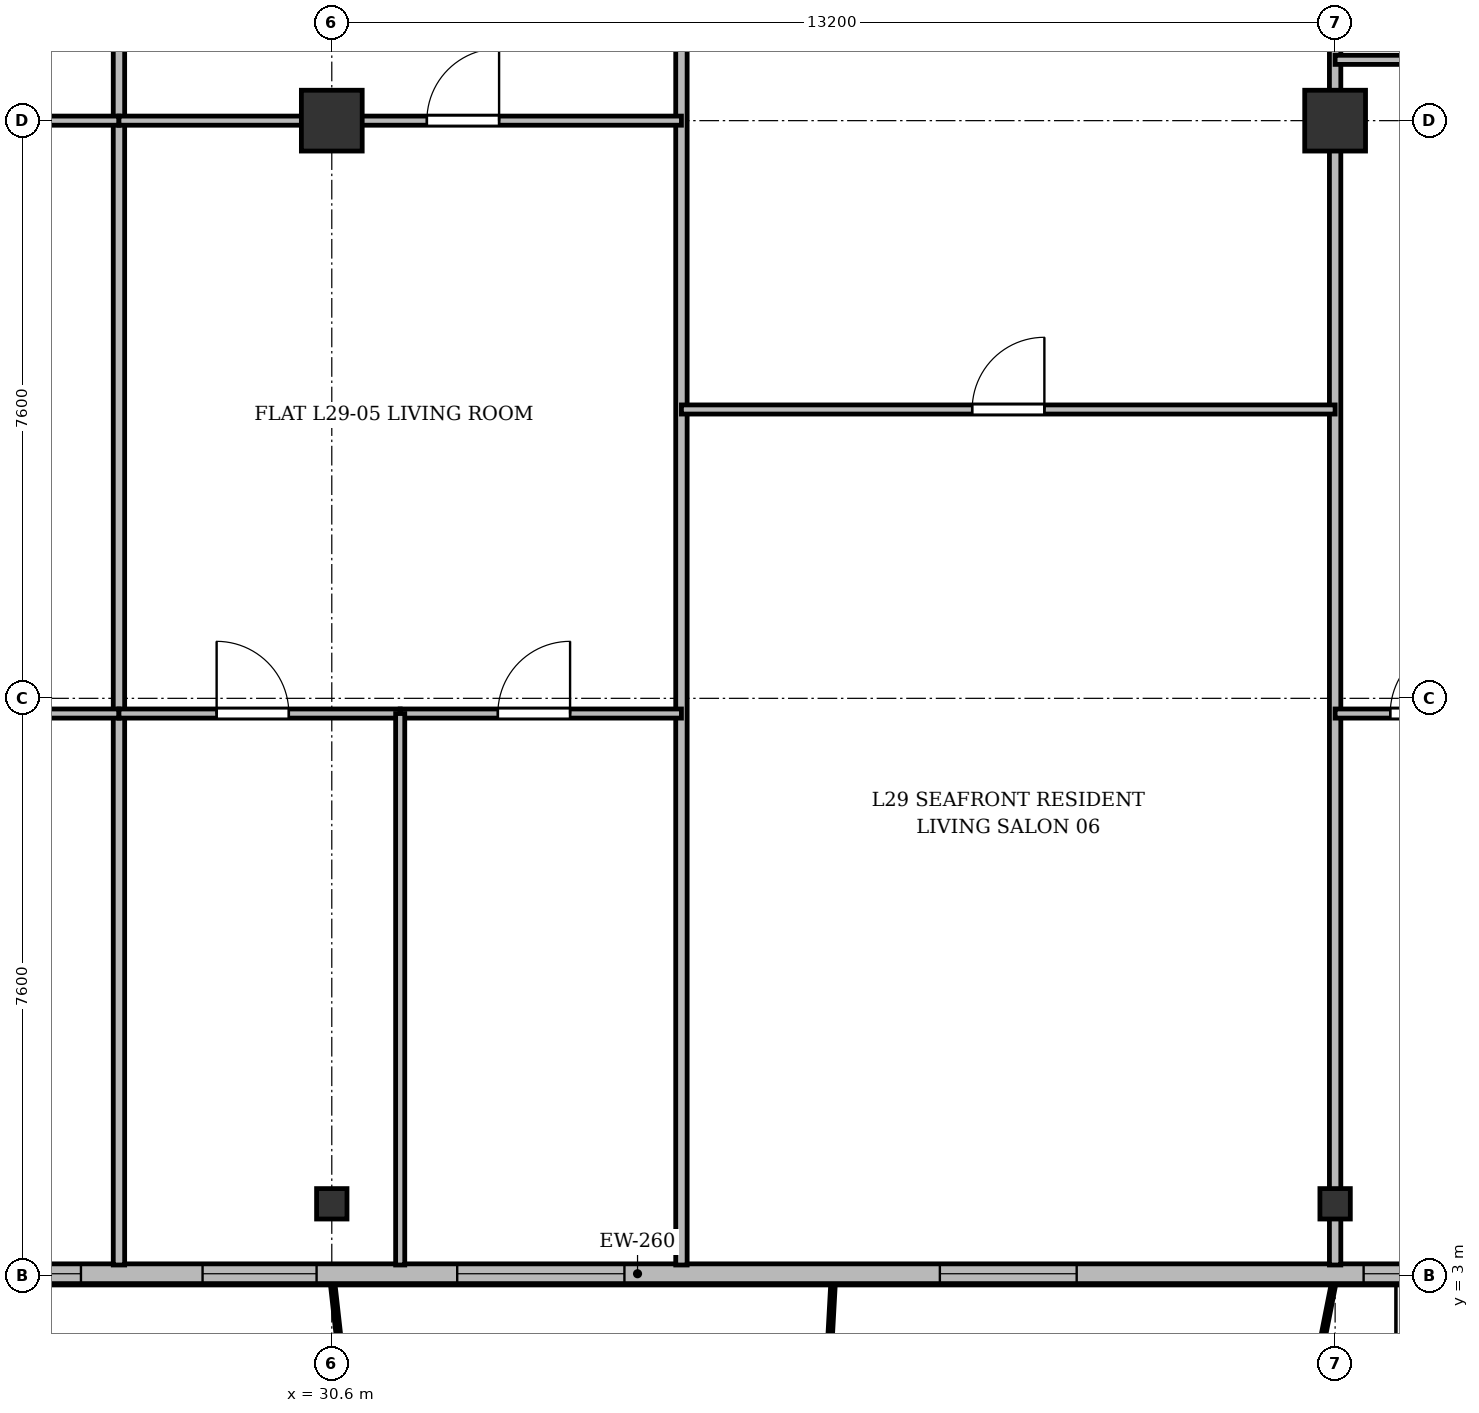
"""IFC4 building model, lengths in metres.
Left out: names, types, materials, properties, quantities, classifications, styles, units other than length and angle.
Written with IfcOpenShell. Run it as: python <this file> out.ifc"""

import sys

from ifc_helpers import new_model, si_unit, direction, frame, frame_2d, origin, origin_2d, place, context, subcontext, project, spatial, rectangle, i_section, extrude, source, transform, mapped, element, fill, save


model = new_model("IFC4")
c1 = context("Model", 3, precision=1e-05, world=origin(), true_north=direction((0.0, 1.0)))
c2 = subcontext(c1, "Body", "Model", "MODEL_VIEW")
j1 = project(units=[si_unit("LENGTHUNIT", "METRE"), si_unit("PLANEANGLEUNIT", "RADIAN")], contexts=[c1])
p1 = place(None, origin())
s1 = spatial("IfcSite", under=j1, at=p1, CompositionType="ELEMENT")
p2 = place(p1, origin())
s2 = spatial("IfcBuilding", under=s1, at=p2, CompositionType="ELEMENT")
p3 = place(p2, frame((0.0, 0.0, 114.1)))
s3 = spatial("IfcBuildingStorey", under=s2, at=p3, CompositionType="ELEMENT", Elevation=114.1)
m1 = source(origin(), c2, "Body", "SweptSolid", [
    extrude(i_section(OverallWidth=0.4, OverallDepth=0.4, WebThickness=0.022, FlangeThickness=0.035, at=origin_2d()), origin(), (0.0, 0.0, 1.0), 3.6),
])
p4 = place(p3, frame((30.6, 3.95, 0.0), z_axis=(0.0, 0.0, 1.0), x_axis=(1.0, 0.0, 0.0)))
e1 = element("IfcColumn", 1, at=p4, inside=s3, PredefinedType="COLUMN", context=c2, shape_type="MappedRepresentation", body=[
    mapped(m1, transform((0.0, 0.0, 0.0), x_axis=(1.0, 0.0, 0.0), y_axis=(0.0, 1.0, 0.0), z_axis=(0.0, 0.0, 1.0), scale=1.0)),
])
m2 = source(origin(), c2, "Body", "SweptSolid", [
    extrude(rectangle(XDim=0.8, YDim=0.8, at=origin_2d()), origin(), (0.0, 0.0, 1.0), 3.6),
])
p5 = place(p3, frame((30.6, 18.2, 0.0), z_axis=(0.0, 0.0, 1.0), x_axis=(1.0, 0.0, 0.0)))
e2 = element("IfcColumn", 2, at=p5, inside=s3, PredefinedType="COLUMN", context=c2, shape_type="MappedRepresentation", body=[
    mapped(m2, transform((0.0, 0.0, 0.0), x_axis=(1.0, 0.0, 0.0), y_axis=(0.0, 1.0, 0.0), z_axis=(0.0, 0.0, 1.0), scale=1.0)),
])
p6 = place(p3, frame((43.8, 3.95, 0.0), z_axis=(0.0, 0.0, 1.0), x_axis=(1.0, 0.0, 0.0)))
e3 = element("IfcColumn", 3, at=p6, inside=s3, PredefinedType="COLUMN", context=c2, shape_type="MappedRepresentation", body=[
    mapped(m1, transform((0.0, 0.0, 0.0), x_axis=(1.0, 0.0, 0.0), y_axis=(0.0, 1.0, 0.0), z_axis=(0.0, 0.0, 1.0), scale=1.0)),
])
p7 = place(p3, frame((43.8, 18.2, 0.0), z_axis=(0.0, 0.0, 1.0), x_axis=(1.0, 0.0, 0.0)))
e4 = element("IfcColumn", 4, at=p7, inside=s3, PredefinedType="COLUMN", context=c2, shape_type="MappedRepresentation", body=[
    mapped(m2, transform((0.0, 0.0, 0.0), x_axis=(1.0, 0.0, 0.0), y_axis=(0.0, 1.0, 0.0), z_axis=(0.0, 0.0, 1.0), scale=1.0)),
])
p8 = place(p3, frame((66.9, 3.03, 0.0), z_axis=(0.0, 0.0, 1.0), x_axis=(-1.0, 0.0, 0.0)))
e5 = element("IfcWall", 5, at=p8, inside=s3, PredefinedType="SOLIDWALL", context=c2, shape_type="SweptSolid", body=[
    extrude(rectangle(XDim=59.4, YDim=0.26, at=frame_2d((29.7, 0.0))), origin(), (0.0, 0.0, 1.0), 3.34),
])
p9 = place(p8, frame((0.47, 0.0, 0.9)))
e6 = element("IfcOpeningElement", 6, at=p9, cuts=e5, PredefinedType="OPENING", context=c2, shape_type="SweptSolid", body=[
    extrude(rectangle(XDim=1.65, YDim=1.85, at=frame_2d((0.825, 0.925))), frame((0.0, 0.14, 0.0), z_axis=(0.0, -1.0, 0.0), x_axis=(1.0, 0.0, 0.0)), (0.0, 0.0, 1.0), 0.28),
])
p10 = place(p8, frame((4.4, 0.0, 0.9)))
e7 = element("IfcOpeningElement", 7, at=p10, cuts=e5, PredefinedType="OPENING", context=c2, shape_type="SweptSolid", body=[
    extrude(rectangle(XDim=1.8, YDim=1.8, at=frame_2d((0.9, 0.9))), frame((0.0, 0.14, 0.0), z_axis=(0.0, -1.0, 0.0), x_axis=(1.0, 0.0, 0.0)), (0.0, 0.0, 1.0), 0.28),
])
p11 = place(p8, frame((10.9, 0.0, 0.9)))
e8 = element("IfcOpeningElement", 8, at=p11, cuts=e5, PredefinedType="OPENING", context=c2, shape_type="SweptSolid", body=[
    extrude(rectangle(XDim=2.2, YDim=1.8, at=frame_2d((1.1, 0.9))), frame((0.0, 0.14, 0.0), z_axis=(0.0, -1.0, 0.0), x_axis=(1.0, 0.0, 0.0)), (0.0, 0.0, 1.0), 0.28),
])
p12 = place(p8, frame((16.92, 0.0, 0.0)))
e9 = element("IfcOpeningElement", 9, at=p12, cuts=e5, PredefinedType="OPENING", context=c2, shape_type="SweptSolid", body=[
    extrude(rectangle(XDim=1.2, YDim=2.2, at=frame_2d((0.6, 1.1))), frame((0.0, 0.14, 0.0), z_axis=(0.0, -1.0, 0.0), x_axis=(1.0, 0.0, 0.0)), (0.0, 0.0, 1.0), 0.28),
])
p13 = place(p8, frame((18.75, 0.0, 0.9)))
e10 = element("IfcOpeningElement", 10, at=p13, cuts=e5, PredefinedType="OPENING", context=c2, shape_type="SweptSolid", body=[
    extrude(rectangle(XDim=1.5, YDim=1.75, at=frame_2d((0.75, 0.875))), frame((0.0, 0.14, 0.0), z_axis=(0.0, -1.0, 0.0), x_axis=(1.0, 0.0, 0.0)), (0.0, 0.0, 1.0), 0.28),
])
p14 = place(p8, frame((21.075, 0.0, 0.9)))
e11 = element("IfcOpeningElement", 11, at=p14, cuts=e5, PredefinedType="OPENING", context=c2, shape_type="SweptSolid", body=[
    extrude(rectangle(XDim=1.65, YDim=1.85, at=frame_2d((0.825, 0.925))), frame((0.0, 0.14, 0.0), z_axis=(0.0, -1.0, 0.0), x_axis=(1.0, 0.0, 0.0)), (0.0, 0.0, 1.0), 0.28),
])
p15 = place(p8, frame((26.5, 0.0, 0.9)))
e12 = element("IfcOpeningElement", 12, at=p15, cuts=e5, PredefinedType="OPENING", context=c2, shape_type="SweptSolid", body=[
    extrude(rectangle(XDim=1.8, YDim=1.8, at=frame_2d((0.9, 0.9))), frame((0.0, 0.14, 0.0), z_axis=(0.0, -1.0, 0.0), x_axis=(1.0, 0.0, 0.0)), (0.0, 0.0, 1.0), 0.28),
])
p16 = place(p8, frame((32.45, 0.0, 0.9)))
e13 = element("IfcOpeningElement", 13, at=p16, cuts=e5, PredefinedType="OPENING", context=c2, shape_type="SweptSolid", body=[
    extrude(rectangle(XDim=2.2, YDim=1.8, at=frame_2d((1.1, 0.9))), frame((0.0, 0.14, 0.0), z_axis=(0.0, -1.0, 0.0), x_axis=(1.0, 0.0, 0.0)), (0.0, 0.0, 1.0), 0.28),
])
p17 = place(p8, frame((36.5, 0.0, 0.9)))
e14 = element("IfcOpeningElement", 14, at=p17, cuts=e5, PredefinedType="OPENING", context=c2, shape_type="SweptSolid", body=[
    extrude(rectangle(XDim=1.5, YDim=1.75, at=frame_2d((0.75, 0.875))), frame((0.0, 0.14, 0.0), z_axis=(0.0, -1.0, 0.0), x_axis=(1.0, 0.0, 0.0)), (0.0, 0.0, 1.0), 0.28),
])
p18 = place(p8, frame((39.6, 0.0, 0.9)))
e15 = element("IfcOpeningElement", 15, at=p18, cuts=e5, PredefinedType="OPENING", context=c2, shape_type="SweptSolid", body=[
    extrude(rectangle(XDim=2.0, YDim=1.95, at=frame_2d((1.0, 0.975))), frame((0.0, 0.14, 0.0), z_axis=(0.0, -1.0, 0.0), x_axis=(1.0, 0.0, 0.0)), (0.0, 0.0, 1.0), 0.28),
])
p19 = place(p8, frame((42.775, 0.0, 0.9)))
e16 = element("IfcOpeningElement", 16, at=p19, cuts=e5, PredefinedType="OPENING", context=c2, shape_type="SweptSolid", body=[
    extrude(rectangle(XDim=1.65, YDim=1.85, at=frame_2d((0.825, 0.925))), frame((0.0, 0.14, 0.0), z_axis=(0.0, -1.0, 0.0), x_axis=(1.0, 0.0, 0.0)), (0.0, 0.0, 1.0), 0.28),
])
p20 = place(p8, frame((46.435, 0.0, 0.0)))
e17 = element("IfcOpeningElement", 17, at=p20, cuts=e5, PredefinedType="OPENING", context=c2, shape_type="SweptSolid", body=[
    extrude(rectangle(XDim=1.2, YDim=2.2, at=frame_2d((0.6, 1.1))), frame((0.0, 0.14, 0.0), z_axis=(0.0, -1.0, 0.0), x_axis=(1.0, 0.0, 0.0)), (0.0, 0.0, 1.0), 0.28),
])
p21 = place(p8, frame((48.65, 0.0, 0.9)))
e18 = element("IfcOpeningElement", 18, at=p21, cuts=e5, PredefinedType="OPENING", context=c2, shape_type="SweptSolid", body=[
    extrude(rectangle(XDim=2.2, YDim=1.8, at=frame_2d((1.1, 0.9))), frame((0.0, 0.14, 0.0), z_axis=(0.0, -1.0, 0.0), x_axis=(1.0, 0.0, 0.0)), (0.0, 0.0, 1.0), 0.28),
])
p22 = place(p8, frame((53.25, 0.0, 0.9)))
e19 = element("IfcOpeningElement", 19, at=p22, cuts=e5, PredefinedType="OPENING", context=c2, shape_type="SweptSolid", body=[
    extrude(rectangle(XDim=1.5, YDim=1.75, at=frame_2d((0.75, 0.875))), frame((0.0, 0.14, 0.0), z_axis=(0.0, -1.0, 0.0), x_axis=(1.0, 0.0, 0.0)), (0.0, 0.0, 1.0), 0.28),
])
p23 = place(p8, frame((57.005, 0.0, 0.9)))
e20 = element("IfcOpeningElement", 20, at=p23, cuts=e5, PredefinedType="OPENING", context=c2, shape_type="SweptSolid", body=[
    extrude(rectangle(XDim=2.0, YDim=1.95, at=frame_2d((1.0, 0.975))), frame((0.0, 0.14, 0.0), z_axis=(0.0, -1.0, 0.0), x_axis=(1.0, 0.0, 0.0)), (0.0, 0.0, 1.0), 0.28),
])
for number, where, z_axis, x_axis in (
    (21, (27.8, 3.145, 0.0), (0.0, 0.0, 1.0), (0.0, 1.0, 0.0)),
    (22, (35.2, 3.145, 0.0), (0.0, 0.0, 1.0), (0.0, 1.0, 0.0)),
):
    element("IfcWall", number, at=place(p3, frame(where, z_axis=z_axis, x_axis=x_axis)), inside=s3, PredefinedType="PARTITIONING", context=c2, shape_type="SweptSolid", body=[
        extrude(rectangle(XDim=24.455, YDim=0.15, at=frame_2d((12.228, 0.0))), origin(), (0.0, 0.0, 1.0), 2.752),
    ])
p24 = place(p3, frame((43.8, 3.145, 0.0), z_axis=(0.0, 0.0, 1.0), x_axis=(0.0, 1.0, 0.0)))
e23 = element("IfcWall", 23, at=p24, inside=s3, PredefinedType="PARTITIONING", context=c2, shape_type="SweptSolid", body=[
    extrude(rectangle(XDim=24.455, YDim=0.15, at=frame_2d((12.228, 0.0))), origin(), (0.0, 0.0, 1.0), 2.84),
])
p25 = place(p3, frame((21.8, 18.2, 0.0), z_axis=(0.0, 0.0, 1.0), x_axis=(1.0, 0.0, 0.0)))
e24 = element("IfcWall", 24, at=p25, inside=s3, PredefinedType="PARTITIONING", context=c2, shape_type="SweptSolid", body=[
    extrude(rectangle(XDim=6.0, YDim=0.12, at=frame_2d((3.0, 0.0))), origin(), (0.0, 0.0, 1.0), 2.752),
])
p26 = place(p25, frame((2.618, 0.0, 0.0)))
e25 = element("IfcOpeningElement", 25, at=p26, cuts=e24, PredefinedType="OPENING", context=c2, shape_type="SweptSolid", body=[
    extrude(rectangle(XDim=0.95, YDim=2.15, at=frame_2d((0.475, 1.075))), frame((0.0, 0.07, 0.0), z_axis=(0.0, -1.0, 0.0), x_axis=(1.0, 0.0, 0.0)), (0.0, 0.0, 1.0), 0.14),
])
p27 = place(p3, frame((24.8, 10.4, 0.0), z_axis=(0.0, 0.0, 1.0), x_axis=(1.0, 0.0, 0.0)))
e26 = element("IfcWall", 26, at=p27, inside=s3, PredefinedType="PARTITIONING", context=c2, shape_type="SweptSolid", body=[
    extrude(rectangle(XDim=3.0, YDim=0.12, at=frame_2d((1.5, 0.0))), origin(), (0.0, 0.0, 1.0), 3.34),
])
p28 = place(p27, frame((1.025, 0.0, 0.0)))
e27 = element("IfcOpeningElement", 27, at=p28, cuts=e26, PredefinedType="OPENING", context=c2, shape_type="SweptSolid", body=[
    extrude(rectangle(XDim=0.95, YDim=2.15, at=frame_2d((0.475, 1.075))), frame((0.0, 0.07, 0.0), z_axis=(0.0, -1.0, 0.0), x_axis=(1.0, 0.0, 0.0)), (0.0, 0.0, 1.0), 0.14),
])
p29 = place(p3, frame((27.8, 18.2, 0.0), z_axis=(0.0, 0.0, 1.0), x_axis=(1.0, 0.0, 0.0)))
e28 = element("IfcWall", 28, at=p29, inside=s3, PredefinedType="PARTITIONING", context=c2, shape_type="SweptSolid", body=[
    extrude(rectangle(XDim=7.4, YDim=0.12, at=frame_2d((3.7, 0.0))), origin(), (0.0, 0.0, 1.0), 2.752),
])
p30 = place(p29, frame((4.051, 0.0, 0.0)))
e29 = element("IfcOpeningElement", 29, at=p30, cuts=e28, PredefinedType="OPENING", context=c2, shape_type="SweptSolid", body=[
    extrude(rectangle(XDim=0.95, YDim=2.15, at=frame_2d((0.475, 1.075))), frame((0.0, 0.07, 0.0), z_axis=(0.0, -1.0, 0.0), x_axis=(1.0, 0.0, 0.0)), (0.0, 0.0, 1.0), 0.14),
])
p31 = place(p3, frame((27.8, 10.4, 0.0), z_axis=(0.0, 0.0, 1.0), x_axis=(1.0, 0.0, 0.0)))
e30 = element("IfcWall", 30, at=p31, inside=s3, PredefinedType="PARTITIONING", context=c2, shape_type="SweptSolid", body=[
    extrude(rectangle(XDim=3.7, YDim=0.12, at=frame_2d((1.85, 0.0))), origin(), (0.0, 0.0, 1.0), 2.84),
])
p32 = place(p31, frame((1.285, 0.0, 0.0)))
e31 = element("IfcOpeningElement", 31, at=p32, cuts=e30, PredefinedType="OPENING", context=c2, shape_type="SweptSolid", body=[
    extrude(rectangle(XDim=0.95, YDim=2.15, at=frame_2d((0.475, 1.075))), frame((0.0, 0.07, 0.0), z_axis=(0.0, -1.0, 0.0), x_axis=(1.0, 0.0, 0.0)), (0.0, 0.0, 1.0), 0.14),
])
p33 = place(p3, frame((31.5, 10.4, 0.0), z_axis=(0.0, 0.0, 1.0), x_axis=(1.0, 0.0, 0.0)))
e32 = element("IfcWall", 32, at=p33, inside=s3, PredefinedType="PARTITIONING", context=c2, shape_type="SweptSolid", body=[
    extrude(rectangle(XDim=3.7, YDim=0.12, at=frame_2d((1.85, 0.0))), origin(), (0.0, 0.0, 1.0), 3.34),
])
p34 = place(p33, frame((1.285, 0.0, 0.0)))
e33 = element("IfcOpeningElement", 33, at=p34, cuts=e32, PredefinedType="OPENING", context=c2, shape_type="SweptSolid", body=[
    extrude(rectangle(XDim=0.95, YDim=2.15, at=frame_2d((0.475, 1.075))), frame((0.0, 0.07, 0.0), z_axis=(0.0, -1.0, 0.0), x_axis=(1.0, 0.0, 0.0)), (0.0, 0.0, 1.0), 0.14),
])
p35 = place(p3, frame((31.5, 3.145, 0.0), z_axis=(0.0, 0.0, 1.0), x_axis=(0.0, 1.0, 0.0)))
e34 = element("IfcWall", 34, at=p35, inside=s3, PredefinedType="PARTITIONING", context=c2, shape_type="SweptSolid", body=[
    extrude(rectangle(XDim=7.255, YDim=0.12, at=frame_2d((3.627, 0.0))), origin(), (0.0, 0.0, 1.0), 2.752),
])
p36 = place(p3, frame((35.2, 14.4, 0.0), z_axis=(0.0, 0.0, 1.0), x_axis=(1.0, 0.0, 0.0)))
e35 = element("IfcWall", 35, at=p36, inside=s3, PredefinedType="PARTITIONING", context=c2, shape_type="SweptSolid", body=[
    extrude(rectangle(XDim=8.6, YDim=0.12, at=frame_2d((4.3, 0.0))), origin(), (0.0, 0.0, 1.0), 2.84),
])
p37 = place(p36, frame((3.825, 0.0, 0.0)))
e36 = element("IfcOpeningElement", 36, at=p37, cuts=e35, PredefinedType="OPENING", context=c2, shape_type="SweptSolid", body=[
    extrude(rectangle(XDim=0.95, YDim=2.15, at=frame_2d((0.475, 1.075))), frame((0.0, 0.07, 0.0), z_axis=(0.0, -1.0, 0.0), x_axis=(1.0, 0.0, 0.0)), (0.0, 0.0, 1.0), 0.14),
])
p38 = place(p3, frame((43.8, 19.0, 0.0), z_axis=(0.0, 0.0, 1.0), x_axis=(1.0, 0.0, 0.0)))
e37 = element("IfcWall", 37, at=p38, inside=s3, PredefinedType="PARTITIONING", context=c2, shape_type="SweptSolid", body=[
    extrude(rectangle(XDim=7.2, YDim=0.12, at=frame_2d((3.6, 0.0))), origin(), (0.0, 0.0, 1.0), 2.84),
])
p39 = place(p38, frame((3.125, 0.0, 0.0)))
e38 = element("IfcOpeningElement", 38, at=p39, cuts=e37, PredefinedType="OPENING", context=c2, shape_type="SweptSolid", body=[
    extrude(rectangle(XDim=0.95, YDim=2.15, at=frame_2d((0.475, 1.075))), frame((0.0, 0.07, 0.0), z_axis=(0.0, -1.0, 0.0), x_axis=(1.0, 0.0, 0.0)), (0.0, 0.0, 1.0), 0.14),
])
p40 = place(p3, frame((43.8, 10.4, 0.0), z_axis=(0.0, 0.0, 1.0), x_axis=(1.0, 0.0, 0.0)))
e39 = element("IfcWall", 39, at=p40, inside=s3, PredefinedType="PARTITIONING", context=c2, shape_type="SweptSolid", body=[
    extrude(rectangle(XDim=2.4, YDim=0.12, at=frame_2d((1.2, 0.0))), origin(), (0.0, 0.0, 1.0), 2.84),
])
p41 = place(p40, frame((0.725, 0.0, 0.0)))
e40 = element("IfcOpeningElement", 40, at=p41, cuts=e39, PredefinedType="OPENING", context=c2, shape_type="SweptSolid", body=[
    extrude(rectangle(XDim=0.95, YDim=2.15, at=frame_2d((0.475, 1.075))), frame((0.0, 0.07, 0.0), z_axis=(0.0, -1.0, 0.0), x_axis=(1.0, 0.0, 0.0)), (0.0, 0.0, 1.0), 0.14),
])
m3 = source(origin(), c2, "Body", "SweptSolid", [
    extrude(rectangle(XDim=1.65, YDim=1.85, at=frame_2d((0.825, 0.925))), frame((0.0, 0.03, 0.0), z_axis=(0.0, -1.0, 0.0), x_axis=(1.0, 0.0, 0.0)), (0.0, 0.0, 1.0), 0.06),
])
p42 = place(p14, origin())
e41 = element("IfcWindow", 41, at=p42, inside=s3, PartitioningType="SINGLE_PANEL", PredefinedType="WINDOW", context=c2, shape_type="MappedRepresentation", body=[
    mapped(m3, transform((0.0, 0.0, 0.0), x_axis=(1.0, 0.0, 0.0), y_axis=(0.0, 1.0, 0.0), z_axis=(0.0, 0.0, 1.0), scale=1.0)),
])
fill(e11, e41)
m4 = source(origin(), c2, "Body", "SweptSolid", [
    extrude(rectangle(XDim=1.8, YDim=1.8, at=frame_2d((0.9, 0.9))), frame((0.0, 0.03, 0.0), z_axis=(0.0, -1.0, 0.0), x_axis=(1.0, 0.0, 0.0)), (0.0, 0.0, 1.0), 0.06),
])
p43 = place(p15, origin())
e42 = element("IfcWindow", 42, at=p43, inside=s3, PartitioningType="SINGLE_PANEL", PredefinedType="WINDOW", context=c2, shape_type="MappedRepresentation", body=[
    mapped(m4, transform((0.0, 0.0, 0.0), x_axis=(1.0, 0.0, 0.0), y_axis=(0.0, 1.0, 0.0), z_axis=(0.0, 0.0, 1.0), scale=1.0)),
])
fill(e12, e42)
m5 = source(origin(), c2, "Body", "SweptSolid", [
    extrude(rectangle(XDim=2.2, YDim=1.8, at=frame_2d((1.1, 0.9))), frame((0.0, 0.03, 0.0), z_axis=(0.0, -1.0, 0.0), x_axis=(1.0, 0.0, 0.0)), (0.0, 0.0, 1.0), 0.06),
])
p44 = place(p16, origin())
e43 = element("IfcWindow", 43, at=p44, inside=s3, PartitioningType="SINGLE_PANEL", PredefinedType="WINDOW", context=c2, shape_type="MappedRepresentation", body=[
    mapped(m5, transform((0.0, 0.0, 0.0), x_axis=(1.0, 0.0, 0.0), y_axis=(0.0, 1.0, 0.0), z_axis=(0.0, 0.0, 1.0), scale=1.0)),
])
fill(e13, e43)
m6 = source(origin(), c2, "Body", "SweptSolid", [
    extrude(rectangle(XDim=1.5, YDim=1.75, at=frame_2d((0.75, 0.875))), frame((0.0, 0.03, 0.0), z_axis=(0.0, -1.0, 0.0), x_axis=(1.0, 0.0, 0.0)), (0.0, 0.0, 1.0), 0.06),
])
p45 = place(p17, origin())
e44 = element("IfcWindow", 44, at=p45, inside=s3, PartitioningType="SINGLE_PANEL", PredefinedType="WINDOW", context=c2, shape_type="MappedRepresentation", body=[
    mapped(m6, transform((0.0, 0.0, 0.0), x_axis=(1.0, 0.0, 0.0), y_axis=(0.0, 1.0, 0.0), z_axis=(0.0, 0.0, 1.0), scale=1.0)),
])
fill(e14, e44)
m7 = source(origin(), c2, "Body", "SweptSolid", [
    extrude(rectangle(XDim=2.0, YDim=1.95, at=frame_2d((1.0, 0.975))), frame((0.0, 0.03, 0.0), z_axis=(0.0, -1.0, 0.0), x_axis=(1.0, 0.0, 0.0)), (0.0, 0.0, 1.0), 0.06),
])
p46 = place(p18, origin())
e45 = element("IfcWindow", 45, at=p46, inside=s3, PartitioningType="SINGLE_PANEL", PredefinedType="WINDOW", context=c2, shape_type="MappedRepresentation", body=[
    mapped(m7, transform((0.0, 0.0, 0.0), x_axis=(1.0, 0.0, 0.0), y_axis=(0.0, 1.0, 0.0), z_axis=(0.0, 0.0, 1.0), scale=1.0)),
])
fill(e15, e45)
m8 = source(origin(), c2, "Body", "SweptSolid", [
    extrude(rectangle(XDim=0.95, YDim=2.15, at=frame_2d((0.475, 1.075))), frame((0.0, 0.025, 0.0), z_axis=(0.0, -1.0, 0.0), x_axis=(1.0, 0.0, 0.0)), (0.0, 0.0, 1.0), 0.05),
])
p47 = place(p30, origin())
e46 = element("IfcDoor", 46, at=p47, inside=s3, OperationType="SINGLE_SWING_RIGHT", PredefinedType="DOOR", context=c2, shape_type="MappedRepresentation", body=[
    mapped(m8, transform((0.0, 0.0, 0.0), x_axis=(1.0, 0.0, 0.0), y_axis=(0.0, 1.0, 0.0), z_axis=(0.0, 0.0, 1.0), scale=1.0)),
])
fill(e29, e46)
p48 = place(p32, origin())
e47 = element("IfcDoor", 47, at=p48, inside=s3, OperationType="SINGLE_SWING_LEFT", PredefinedType="DOOR", context=c2, shape_type="MappedRepresentation", body=[
    mapped(m8, transform((0.0, 0.0, 0.0), x_axis=(1.0, 0.0, 0.0), y_axis=(0.0, 1.0, 0.0), z_axis=(0.0, 0.0, 1.0), scale=1.0)),
])
fill(e31, e47)
p49 = place(p34, origin())
e48 = element("IfcDoor", 48, at=p49, inside=s3, OperationType="SINGLE_SWING_RIGHT", PredefinedType="DOOR", context=c2, shape_type="MappedRepresentation", body=[
    mapped(m8, transform((0.0, 0.0, 0.0), x_axis=(1.0, 0.0, 0.0), y_axis=(0.0, 1.0, 0.0), z_axis=(0.0, 0.0, 1.0), scale=1.0)),
])
fill(e33, e48)
p50 = place(p37, origin())
e49 = element("IfcDoor", 49, at=p50, inside=s3, OperationType="SINGLE_SWING_RIGHT", PredefinedType="DOOR", context=c2, shape_type="MappedRepresentation", body=[
    mapped(m8, transform((0.0, 0.0, 0.0), x_axis=(1.0, 0.0, 0.0), y_axis=(0.0, 1.0, 0.0), z_axis=(0.0, 0.0, 1.0), scale=1.0)),
])
fill(e36, e49)
p51 = place(p41, origin())
e50 = element("IfcDoor", 50, at=p51, inside=s3, OperationType="SINGLE_SWING_RIGHT", PredefinedType="DOOR", context=c2, shape_type="MappedRepresentation", body=[
    mapped(m8, transform((0.0, 0.0, 0.0), x_axis=(1.0, 0.0, 0.0), y_axis=(0.0, 1.0, 0.0), z_axis=(0.0, 0.0, 1.0), scale=1.0)),
])
fill(e40, e50)
save(model, sys.argv[1])
